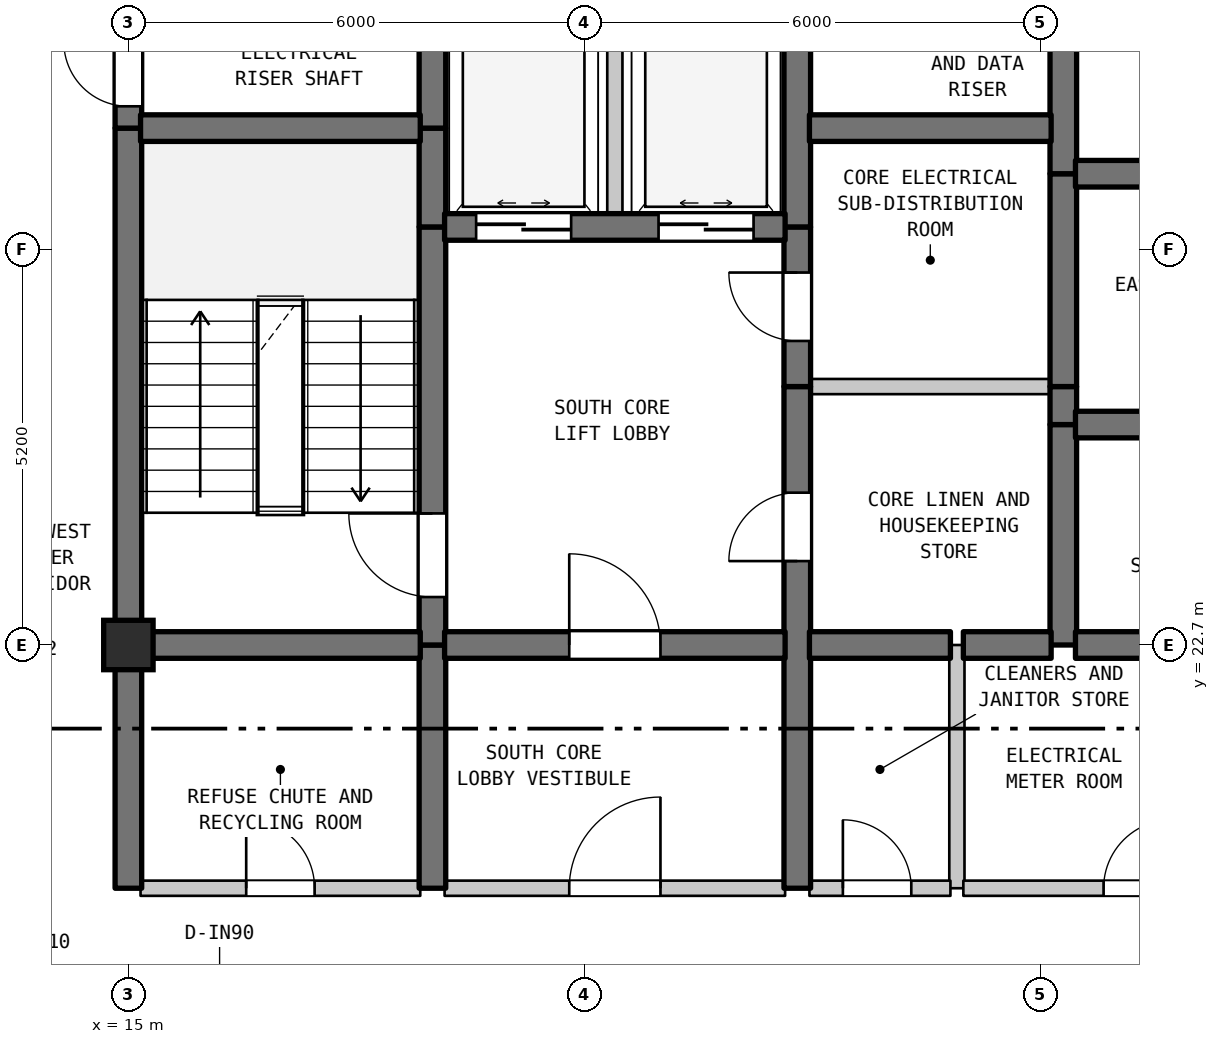
"""IFC4 building model, lengths in metres.
Left out: names, types, materials, properties, quantities, classifications, styles, units other than length and angle.
Written with IfcOpenShell. Run it as: python <this file> out.ifc"""

import sys

from ifc_helpers import new_model, si_unit, direction, frame, frame_2d, origin, origin_2d, place, context, subcontext, project, spatial, rectangle, extrude, element, fill, save


model = new_model("IFC4")
c1 = context("Model", 3, precision=1e-05, world=origin(), true_north=direction((0.0, 1.0)))
c2 = subcontext(c1, "Body", "Model", "MODEL_VIEW")
j1 = project(units=[si_unit("LENGTHUNIT", "METRE"), si_unit("PLANEANGLEUNIT", "RADIAN")], contexts=[c1])
p1 = place(None, origin())
s1 = spatial("IfcSite", under=j1, at=p1, CompositionType="ELEMENT")
p2 = place(p1, origin())
s2 = spatial("IfcBuilding", under=s1, at=p2, CompositionType="ELEMENT")
p3 = place(p2, frame((0.0, 0.0, 291.7)))
s3 = spatial("IfcBuildingStorey", under=s2, at=p3, CompositionType="ELEMENT", Elevation=291.7)
p4 = place(p3, frame((15.0, 22.7, 0.0), z_axis=(0.0, 0.0, 1.0), x_axis=(1.0, 0.0, 0.0)))
e1 = element("IfcColumn", 1, at=p4, inside=s3, PredefinedType="COLUMN", context=c2, shape_type="SweptSolid", body=[
    extrude(rectangle(XDim=0.65, YDim=0.65, at=origin_2d()), origin(), (0.0, 0.0, 1.0), 3.7),
])
p5 = place(p3, frame((15.0, 19.5, 0.0), z_axis=(0.0, 0.0, 1.0), x_axis=(0.0, 1.0, 0.0)))
e2 = element("IfcWall", 2, at=p5, inside=s3, PredefinedType="SHEAR", context=c2, shape_type="SweptSolid", body=[
    extrude(rectangle(XDim=3.2, YDim=0.35, at=frame_2d((1.6, 0.0))), origin(), (0.0, 0.0, 1.0), 3.39),
])
p6 = place(p3, frame((15.0, 22.7, 0.0), z_axis=(0.0, 0.0, 1.0), x_axis=(0.0, 1.0, 0.0)))
e3 = element("IfcWall", 3, at=p6, inside=s3, PredefinedType="SHEAR", context=c2, shape_type="SweptSolid", body=[
    extrude(rectangle(XDim=6.8, YDim=0.35, at=frame_2d((3.4, 0.0))), origin(), (0.0, 0.0, 1.0), 3.39),
])
p7 = place(p3, frame((15.0, 29.5, 0.0), z_axis=(0.0, 0.0, 1.0), x_axis=(0.0, 1.0, 0.0)))
e4 = element("IfcWall", 4, at=p7, inside=s3, PredefinedType="SHEAR", context=c2, shape_type="SweptSolid", body=[
    extrude(rectangle(XDim=1.6, YDim=0.35, at=frame_2d((0.8, 0.0))), origin(), (0.0, 0.0, 1.0), 3.39),
])
p8 = place(p7, frame((0.287, 0.0, 0.0)))
e5 = element("IfcOpeningElement", 5, at=p8, cuts=e4, PredefinedType="OPENING", context=c2, shape_type="SweptSolid", body=[
    extrude(rectangle(XDim=0.85, YDim=2.1, at=frame_2d((0.425, 1.05))), frame((0.0, 0.185, 0.0), z_axis=(0.0, -1.0, 0.0), x_axis=(1.0, 0.0, 0.0)), (0.0, 0.0, 1.0), 0.37),
])
p9 = place(p3, frame((19.0, 19.5, 0.0), z_axis=(0.0, 0.0, 1.0), x_axis=(0.0, 1.0, 0.0)))
e6 = element("IfcWall", 6, at=p9, inside=s3, PredefinedType="SHEAR", context=c2, shape_type="SweptSolid", body=[
    extrude(rectangle(XDim=3.2, YDim=0.35, at=frame_2d((1.6, 0.0))), origin(), (0.0, 0.0, 1.0), 3.39),
])
p10 = place(p3, frame((19.0, 22.7, 0.0), z_axis=(0.0, 0.0, 1.0), x_axis=(0.0, 1.0, 0.0)))
e7 = element("IfcWall", 7, at=p10, inside=s3, PredefinedType="SHEAR", context=c2, shape_type="SweptSolid", body=[
    extrude(rectangle(XDim=5.5, YDim=0.35, at=frame_2d((2.75, 0.0))), origin(), (0.0, 0.0, 1.0), 3.39),
])
p11 = place(p10, frame((0.631, 0.0, 0.0)))
e8 = element("IfcOpeningElement", 8, at=p11, cuts=e7, PredefinedType="OPENING", context=c2, shape_type="SweptSolid", body=[
    extrude(rectangle(XDim=1.1, YDim=2.15, at=frame_2d((0.55, 1.075))), frame((0.0, 0.185, 0.0), z_axis=(0.0, -1.0, 0.0), x_axis=(1.0, 0.0, 0.0)), (0.0, 0.0, 1.0), 0.37),
])
p12 = place(p3, frame((19.0, 28.2, 0.0), z_axis=(0.0, 0.0, 1.0), x_axis=(0.0, 1.0, 0.0)))
e9 = element("IfcWall", 9, at=p12, inside=s3, PredefinedType="SHEAR", context=c2, shape_type="SweptSolid", body=[
    extrude(rectangle(XDim=1.3, YDim=0.35, at=frame_2d((0.65, 0.0))), origin(), (0.0, 0.0, 1.0), 3.39),
])
p13 = place(p3, frame((19.0, 29.5, 0.0), z_axis=(0.0, 0.0, 1.0), x_axis=(0.0, 1.0, 0.0)))
e10 = element("IfcWall", 10, at=p13, inside=s3, PredefinedType="SHEAR", context=c2, shape_type="SweptSolid", body=[
    extrude(rectangle(XDim=5.5, YDim=0.35, at=frame_2d((2.75, 0.0))), origin(), (0.0, 0.0, 1.0), 3.39),
])
p14 = place(p13, frame((2.025, 0.0, 0.0)))
e11 = element("IfcOpeningElement", 11, at=p14, cuts=e10, PredefinedType="OPENING", context=c2, shape_type="SweptSolid", body=[
    extrude(rectangle(XDim=1.1, YDim=2.15, at=frame_2d((0.55, 1.075))), frame((0.0, 0.185, 0.0), z_axis=(0.0, -1.0, 0.0), x_axis=(1.0, 0.0, 0.0)), (0.0, 0.0, 1.0), 0.37),
])
p15 = place(p3, frame((21.4, 28.2, 0.0), z_axis=(0.0, 0.0, 1.0), x_axis=(0.0, 1.0, 0.0)))
e12 = element("IfcWall", 12, at=p15, inside=s3, PredefinedType="STANDARD", context=c2, shape_type="SweptSolid", body=[
    extrude(rectangle(XDim=2.6, YDim=0.2, at=frame_2d((1.3, 0.0))), origin(), (0.0, 0.0, 1.0), 3.39),
])
p16 = place(p3, frame((23.8, 19.5, 0.0), z_axis=(0.0, 0.0, 1.0), x_axis=(0.0, 1.0, 0.0)))
e13 = element("IfcWall", 13, at=p16, inside=s3, PredefinedType="SHEAR", context=c2, shape_type="SweptSolid", body=[
    extrude(rectangle(XDim=6.6, YDim=0.35, at=frame_2d((3.3, 0.0))), origin(), (0.0, 0.0, 1.0), 3.39),
])
p17 = place(p16, frame((4.304, 0.0, 0.0)))
e14 = element("IfcOpeningElement", 14, at=p17, cuts=e13, PredefinedType="OPENING", context=c2, shape_type="SweptSolid", body=[
    extrude(rectangle(XDim=0.9, YDim=2.15, at=frame_2d((0.45, 1.075))), frame((0.0, 0.185, 0.0), z_axis=(0.0, -1.0, 0.0), x_axis=(1.0, 0.0, 0.0)), (0.0, 0.0, 1.0), 0.37),
])
p18 = place(p3, frame((23.8, 26.1, 0.0), z_axis=(0.0, 0.0, 1.0), x_axis=(0.0, 1.0, 0.0)))
e15 = element("IfcWall", 15, at=p18, inside=s3, PredefinedType="SHEAR", context=c2, shape_type="SweptSolid", body=[
    extrude(rectangle(XDim=2.1, YDim=0.35, at=frame_2d((1.05, 0.0))), origin(), (0.0, 0.0, 1.0), 3.39),
])
p19 = place(p18, frame((0.6, 0.0, 0.0)))
e16 = element("IfcOpeningElement", 16, at=p19, cuts=e15, PredefinedType="OPENING", context=c2, shape_type="SweptSolid", body=[
    extrude(rectangle(XDim=0.9, YDim=2.15, at=frame_2d((0.45, 1.075))), frame((0.0, 0.185, 0.0), z_axis=(0.0, -1.0, 0.0), x_axis=(1.0, 0.0, 0.0)), (0.0, 0.0, 1.0), 0.37),
])
p20 = place(p3, frame((23.8, 28.2, 0.0), z_axis=(0.0, 0.0, 1.0), x_axis=(0.0, 1.0, 0.0)))
e17 = element("IfcWall", 17, at=p20, inside=s3, PredefinedType="SHEAR", context=c2, shape_type="SweptSolid", body=[
    extrude(rectangle(XDim=2.6, YDim=0.35, at=frame_2d((1.3, 0.0))), origin(), (0.0, 0.0, 1.0), 3.39),
])
p21 = place(p3, frame((25.9, 19.5, 0.0), z_axis=(0.0, 0.0, 1.0), x_axis=(0.0, 1.0, 0.0)))
e18 = element("IfcWall", 18, at=p21, inside=s3, PredefinedType="STANDARD", context=c2, shape_type="SweptSolid", body=[
    extrude(rectangle(XDim=3.2, YDim=0.2, at=frame_2d((1.6, 0.0))), origin(), (0.0, 0.0, 1.0), 3.39),
])
p22 = place(p3, frame((27.3, 22.7, 0.0), z_axis=(0.0, 0.0, 1.0), x_axis=(0.0, 1.0, 0.0)))
e19 = element("IfcWall", 19, at=p22, inside=s3, PredefinedType="SHEAR", context=c2, shape_type="SweptSolid", body=[
    extrude(rectangle(XDim=2.9, YDim=0.35, at=frame_2d((1.45, 0.0))), origin(), (0.0, 0.0, 1.0), 3.39),
])
p23 = place(p3, frame((27.3, 25.6, 0.0), z_axis=(0.0, 0.0, 1.0), x_axis=(0.0, 1.0, 0.0)))
e20 = element("IfcWall", 20, at=p23, inside=s3, PredefinedType="SHEAR", context=c2, shape_type="SweptSolid", body=[
    extrude(rectangle(XDim=0.5, YDim=0.35, at=frame_2d((0.25, 0.0))), origin(), (0.0, 0.0, 1.0), 3.39),
])
p24 = place(p3, frame((27.3, 26.1, 0.0), z_axis=(0.0, 0.0, 1.0), x_axis=(0.0, 1.0, 0.0)))
e21 = element("IfcWall", 21, at=p24, inside=s3, PredefinedType="SHEAR", context=c2, shape_type="SweptSolid", body=[
    extrude(rectangle(XDim=2.8, YDim=0.35, at=frame_2d((1.4, 0.0))), origin(), (0.0, 0.0, 1.0), 3.39),
])
p25 = place(p3, frame((27.3, 28.9, 0.0), z_axis=(0.0, 0.0, 1.0), x_axis=(0.0, 1.0, 0.0)))
e22 = element("IfcWall", 22, at=p25, inside=s3, PredefinedType="SHEAR", context=c2, shape_type="SweptSolid", body=[
    extrude(rectangle(XDim=2.6, YDim=0.35, at=frame_2d((1.3, 0.0))), origin(), (0.0, 0.0, 1.0), 3.39),
])
p26 = place(p3, frame((15.16, 19.5, 0.0), z_axis=(0.0, 0.0, 1.0), x_axis=(1.0, 0.0, 0.0)))
e23 = element("IfcWall", 23, at=p26, inside=s3, PredefinedType="STANDARD", context=c2, shape_type="SweptSolid", body=[
    extrude(rectangle(XDim=3.68, YDim=0.2, at=frame_2d((1.84, 0.0))), origin(), (0.0, 0.0, 1.0), 3.39),
])
p27 = place(p26, frame((1.39, 0.0, 0.0)))
e24 = element("IfcOpeningElement", 24, at=p27, cuts=e23, PredefinedType="OPENING", context=c2, shape_type="SweptSolid", body=[
    extrude(rectangle(XDim=0.9, YDim=2.15, at=frame_2d((0.45, 1.075))), frame((0.0, 0.11, 0.0), z_axis=(0.0, -1.0, 0.0), x_axis=(1.0, 0.0, 0.0)), (0.0, 0.0, 1.0), 0.22),
])
p28 = place(p3, frame((19.16, 19.5, 0.0), z_axis=(0.0, 0.0, 1.0), x_axis=(1.0, 0.0, 0.0)))
e25 = element("IfcWall", 25, at=p28, inside=s3, PredefinedType="STANDARD", context=c2, shape_type="SweptSolid", body=[
    extrude(rectangle(XDim=4.48, YDim=0.2, at=frame_2d((2.24, 0.0))), origin(), (0.0, 0.0, 1.0), 3.39),
])
p29 = place(p28, frame((1.64, 0.0, 0.0)))
e26 = element("IfcOpeningElement", 26, at=p29, cuts=e25, PredefinedType="OPENING", context=c2, shape_type="SweptSolid", body=[
    extrude(rectangle(XDim=1.2, YDim=2.2, at=frame_2d((0.6, 1.1))), frame((0.0, 0.11, 0.0), z_axis=(0.0, -1.0, 0.0), x_axis=(1.0, 0.0, 0.0)), (0.0, 0.0, 1.0), 0.22),
])
p30 = place(p3, frame((23.96, 19.5, 0.0), z_axis=(0.0, 0.0, 1.0), x_axis=(1.0, 0.0, 0.0)))
e27 = element("IfcWall", 27, at=p30, inside=s3, PredefinedType="STANDARD", context=c2, shape_type="SweptSolid", body=[
    extrude(rectangle(XDim=1.855, YDim=0.2, at=frame_2d((0.927, 0.0))), origin(), (0.0, 0.0, 1.0), 3.39),
])
p31 = place(p30, frame((0.44, 0.0, 0.0)))
e28 = element("IfcOpeningElement", 28, at=p31, cuts=e27, PredefinedType="OPENING", context=c2, shape_type="SweptSolid", body=[
    extrude(rectangle(XDim=0.9, YDim=2.15, at=frame_2d((0.45, 1.075))), frame((0.0, 0.11, 0.0), z_axis=(0.0, -1.0, 0.0), x_axis=(1.0, 0.0, 0.0)), (0.0, 0.0, 1.0), 0.22),
])
p32 = place(p3, frame((25.985, 19.5, 0.0), z_axis=(0.0, 0.0, 1.0), x_axis=(1.0, 0.0, 0.0)))
e29 = element("IfcWall", 29, at=p32, inside=s3, PredefinedType="STANDARD", context=c2, shape_type="SweptSolid", body=[
    extrude(rectangle(XDim=4.655, YDim=0.2, at=frame_2d((2.327, 0.0))), origin(), (0.0, 0.0, 1.0), 3.39),
])
p33 = place(p32, frame((1.845, 0.0, 0.0)))
e30 = element("IfcOpeningElement", 30, at=p33, cuts=e29, PredefinedType="OPENING", context=c2, shape_type="SweptSolid", body=[
    extrude(rectangle(XDim=0.9, YDim=2.15, at=frame_2d((0.45, 1.075))), frame((0.0, 0.11, 0.0), z_axis=(0.0, -1.0, 0.0), x_axis=(1.0, 0.0, 0.0)), (0.0, 0.0, 1.0), 0.22),
])
p34 = place(p3, frame((15.16, 22.7, 0.0), z_axis=(0.0, 0.0, 1.0), x_axis=(1.0, 0.0, 0.0)))
e31 = element("IfcWall", 31, at=p34, inside=s3, PredefinedType="SHEAR", context=c2, shape_type="SweptSolid", body=[
    extrude(rectangle(XDim=3.68, YDim=0.35, at=frame_2d((1.84, 0.0))), origin(), (0.0, 0.0, 1.0), 3.39),
])
p35 = place(p3, frame((19.16, 22.7, 0.0), z_axis=(0.0, 0.0, 1.0), x_axis=(1.0, 0.0, 0.0)))
e32 = element("IfcWall", 32, at=p35, inside=s3, PredefinedType="SHEAR", context=c2, shape_type="SweptSolid", body=[
    extrude(rectangle(XDim=4.48, YDim=0.35, at=frame_2d((2.24, 0.0))), origin(), (0.0, 0.0, 1.0), 3.39),
])
p36 = place(p35, frame((1.64, 0.0, 0.0)))
e33 = element("IfcOpeningElement", 33, at=p36, cuts=e32, PredefinedType="OPENING", context=c2, shape_type="SweptSolid", body=[
    extrude(rectangle(XDim=1.2, YDim=2.2, at=frame_2d((0.6, 1.1))), frame((0.0, 0.185, 0.0), z_axis=(0.0, -1.0, 0.0), x_axis=(1.0, 0.0, 0.0)), (0.0, 0.0, 1.0), 0.37),
])
p37 = place(p3, frame((23.96, 22.7, 0.0), z_axis=(0.0, 0.0, 1.0), x_axis=(1.0, 0.0, 0.0)))
e34 = element("IfcWall", 34, at=p37, inside=s3, PredefinedType="SHEAR", context=c2, shape_type="SweptSolid", body=[
    extrude(rectangle(XDim=1.855, YDim=0.35, at=frame_2d((0.927, 0.0))), origin(), (0.0, 0.0, 1.0), 3.39),
])
p38 = place(p3, frame((25.985, 22.7, 0.0), z_axis=(0.0, 0.0, 1.0), x_axis=(1.0, 0.0, 0.0)))
e35 = element("IfcWall", 35, at=p38, inside=s3, PredefinedType="SHEAR", context=c2, shape_type="SweptSolid", body=[
    extrude(rectangle(XDim=1.155, YDim=0.35, at=frame_2d((0.577, 0.0))), origin(), (0.0, 0.0, 1.0), 3.39),
])
p39 = place(p3, frame((27.46, 22.7, 0.0), z_axis=(0.0, 0.0, 1.0), x_axis=(1.0, 0.0, 0.0)))
e36 = element("IfcWall", 36, at=p39, inside=s3, PredefinedType="SHEAR", context=c2, shape_type="SweptSolid", body=[
    extrude(rectangle(XDim=3.18, YDim=0.35, at=frame_2d((1.59, 0.0))), origin(), (0.0, 0.0, 1.0), 3.39),
])
p40 = place(p3, frame((27.46, 25.6, 0.0), z_axis=(0.0, 0.0, 1.0), x_axis=(1.0, 0.0, 0.0)))
e37 = element("IfcWall", 37, at=p40, inside=s3, PredefinedType="SHEAR", context=c2, shape_type="SweptSolid", body=[
    extrude(rectangle(XDim=3.18, YDim=0.35, at=frame_2d((1.59, 0.0))), origin(), (0.0, 0.0, 1.0), 3.39),
])
p41 = place(p40, frame((1.115, 0.0, 0.0)))
e38 = element("IfcOpeningElement", 38, at=p41, cuts=e37, PredefinedType="OPENING", context=c2, shape_type="SweptSolid", body=[
    extrude(rectangle(XDim=0.95, YDim=2.15, at=frame_2d((0.475, 1.075))), frame((0.0, 0.185, 0.0), z_axis=(0.0, -1.0, 0.0), x_axis=(1.0, 0.0, 0.0)), (0.0, 0.0, 1.0), 0.37),
])
p42 = place(p3, frame((23.96, 26.1, 0.0), z_axis=(0.0, 0.0, 1.0), x_axis=(1.0, 0.0, 0.0)))
e39 = element("IfcWall", 39, at=p42, inside=s3, PredefinedType="STANDARD", context=c2, shape_type="SweptSolid", body=[
    extrude(rectangle(XDim=3.18, YDim=0.2, at=frame_2d((1.59, 0.0))), origin(), (0.0, 0.0, 1.0), 3.39),
])
p43 = place(p3, frame((19.16, 28.2, 0.0), z_axis=(0.0, 0.0, 1.0), x_axis=(1.0, 0.0, 0.0)))
e40 = element("IfcWall", 40, at=p43, inside=s3, PredefinedType="SHEAR", context=c2, shape_type="SweptSolid", body=[
    extrude(rectangle(XDim=4.48, YDim=0.35, at=frame_2d((2.24, 0.0))), origin(), (0.0, 0.0, 1.0), 3.39),
])
p44 = place(p43, frame((0.415, 0.0, 0.0)))
e41 = element("IfcOpeningElement", 41, at=p44, cuts=e40, PredefinedType="OPENING", context=c2, shape_type="SweptSolid", body=[
    extrude(rectangle(XDim=1.25, YDim=2.2, at=frame_2d((0.625, 1.1))), frame((0.0, 0.185, 0.0), z_axis=(0.0, -1.0, 0.0), x_axis=(1.0, 0.0, 0.0)), (0.0, 0.0, 1.0), 0.37),
])
p45 = place(p43, frame((2.815, 0.0, 0.0)))
e42 = element("IfcOpeningElement", 42, at=p45, cuts=e40, PredefinedType="OPENING", context=c2, shape_type="SweptSolid", body=[
    extrude(rectangle(XDim=1.25, YDim=2.2, at=frame_2d((0.625, 1.1))), frame((0.0, 0.185, 0.0), z_axis=(0.0, -1.0, 0.0), x_axis=(1.0, 0.0, 0.0)), (0.0, 0.0, 1.0), 0.37),
])
p46 = place(p3, frame((27.46, 28.9, 0.0), z_axis=(0.0, 0.0, 1.0), x_axis=(1.0, 0.0, 0.0)))
e43 = element("IfcWall", 43, at=p46, inside=s3, PredefinedType="SHEAR", context=c2, shape_type="SweptSolid", body=[
    extrude(rectangle(XDim=3.18, YDim=0.35, at=frame_2d((1.59, 0.0))), origin(), (0.0, 0.0, 1.0), 3.39),
])
p47 = place(p46, frame((1.115, 0.0, 0.0)))
e44 = element("IfcOpeningElement", 44, at=p47, cuts=e43, PredefinedType="OPENING", context=c2, shape_type="SweptSolid", body=[
    extrude(rectangle(XDim=0.95, YDim=2.15, at=frame_2d((0.475, 1.075))), frame((0.0, 0.185, 0.0), z_axis=(0.0, -1.0, 0.0), x_axis=(1.0, 0.0, 0.0)), (0.0, 0.0, 1.0), 0.37),
])
p48 = place(p3, frame((15.16, 29.5, 0.0), z_axis=(0.0, 0.0, 1.0), x_axis=(1.0, 0.0, 0.0)))
e45 = element("IfcWall", 45, at=p48, inside=s3, PredefinedType="SHEAR", context=c2, shape_type="SweptSolid", body=[
    extrude(rectangle(XDim=3.68, YDim=0.35, at=frame_2d((1.84, 0.0))), origin(), (0.0, 0.0, 1.0), 3.39),
])
p49 = place(p3, frame((23.96, 29.5, 0.0), z_axis=(0.0, 0.0, 1.0), x_axis=(1.0, 0.0, 0.0)))
e46 = element("IfcWall", 46, at=p49, inside=s3, PredefinedType="SHEAR", context=c2, shape_type="SweptSolid", body=[
    extrude(rectangle(XDim=3.18, YDim=0.35, at=frame_2d((1.59, 0.0))), origin(), (0.0, 0.0, 1.0), 3.39),
])
p50 = place(p8, origin())
e47 = element("IfcDoor", 47, at=p50, inside=s3, OperationType="SINGLE_SWING_RIGHT", PredefinedType="DOOR", context=c2, shape_type="SweptSolid", body=[
    extrude(rectangle(XDim=0.85, YDim=2.1, at=frame_2d((0.425, 1.05))), frame((0.0, 0.025, 0.0), z_axis=(0.0, -1.0, 0.0), x_axis=(1.0, 0.0, 0.0)), (0.0, 0.0, 1.0), 0.05),
])
fill(e5, e47)
p51 = place(p11, origin())
e48 = element("IfcDoor", 48, at=p51, inside=s3, OperationType="SINGLE_SWING_RIGHT", PredefinedType="DOOR", context=c2, shape_type="SweptSolid", body=[
    extrude(rectangle(XDim=1.1, YDim=2.15, at=frame_2d((0.55, 1.075))), frame((0.0, 0.025, 0.0), z_axis=(0.0, -1.0, 0.0), x_axis=(1.0, 0.0, 0.0)), (0.0, 0.0, 1.0), 0.05),
])
fill(e8, e48)
p52 = place(p17, origin())
e49 = element("IfcDoor", 49, at=p52, inside=s3, OperationType="SINGLE_SWING_LEFT", PredefinedType="DOOR", context=c2, shape_type="SweptSolid", body=[
    extrude(rectangle(XDim=0.9, YDim=2.15, at=frame_2d((0.45, 1.075))), frame((0.0, 0.025, 0.0), z_axis=(0.0, -1.0, 0.0), x_axis=(1.0, 0.0, 0.0)), (0.0, 0.0, 1.0), 0.05),
])
fill(e14, e49)
p53 = place(p19, origin())
e50 = element("IfcDoor", 50, at=p53, inside=s3, OperationType="SINGLE_SWING_RIGHT", PredefinedType="DOOR", context=c2, shape_type="SweptSolid", body=[
    extrude(rectangle(XDim=0.9, YDim=2.15, at=frame_2d((0.45, 1.075))), frame((0.0, 0.025, 0.0), z_axis=(0.0, -1.0, 0.0), x_axis=(1.0, 0.0, 0.0)), (0.0, 0.0, 1.0), 0.05),
])
fill(e16, e50)
p54 = place(p27, origin())
e51 = element("IfcDoor", 51, at=p54, inside=s3, OperationType="SINGLE_SWING_LEFT", PredefinedType="DOOR", context=c2, shape_type="SweptSolid", body=[
    extrude(rectangle(XDim=0.9, YDim=2.15, at=frame_2d((0.45, 1.075))), frame((0.0, 0.025, 0.0), z_axis=(0.0, -1.0, 0.0), x_axis=(1.0, 0.0, 0.0)), (0.0, 0.0, 1.0), 0.05),
])
fill(e24, e51)
p55 = place(p29, origin())
e52 = element("IfcDoor", 52, at=p55, inside=s3, OperationType="SINGLE_SWING_RIGHT", PredefinedType="DOOR", context=c2, shape_type="SweptSolid", body=[
    extrude(rectangle(XDim=1.2, YDim=2.2, at=frame_2d((0.6, 1.1))), frame((0.0, 0.025, 0.0), z_axis=(0.0, -1.0, 0.0), x_axis=(1.0, 0.0, 0.0)), (0.0, 0.0, 1.0), 0.05),
])
fill(e26, e52)
p56 = place(p31, origin())
e53 = element("IfcDoor", 53, at=p56, inside=s3, OperationType="SINGLE_SWING_LEFT", PredefinedType="DOOR", context=c2, shape_type="SweptSolid", body=[
    extrude(rectangle(XDim=0.9, YDim=2.15, at=frame_2d((0.45, 1.075))), frame((0.0, 0.025, 0.0), z_axis=(0.0, -1.0, 0.0), x_axis=(1.0, 0.0, 0.0)), (0.0, 0.0, 1.0), 0.05),
])
fill(e28, e53)
p57 = place(p33, origin())
e54 = element("IfcDoor", 54, at=p57, inside=s3, OperationType="SINGLE_SWING_RIGHT", PredefinedType="DOOR", context=c2, shape_type="SweptSolid", body=[
    extrude(rectangle(XDim=0.9, YDim=2.15, at=frame_2d((0.45, 1.075))), frame((0.0, 0.025, 0.0), z_axis=(0.0, -1.0, 0.0), x_axis=(1.0, 0.0, 0.0)), (0.0, 0.0, 1.0), 0.05),
])
fill(e30, e54)
p58 = place(p36, origin())
e55 = element("IfcDoor", 55, at=p58, inside=s3, OperationType="SINGLE_SWING_LEFT", PredefinedType="DOOR", context=c2, shape_type="SweptSolid", body=[
    extrude(rectangle(XDim=1.2, YDim=2.2, at=frame_2d((0.6, 1.1))), frame((0.0, 0.025, 0.0), z_axis=(0.0, -1.0, 0.0), x_axis=(1.0, 0.0, 0.0)), (0.0, 0.0, 1.0), 0.05),
])
fill(e33, e55)
p59 = place(p44, origin())
e56 = element("IfcDoor", 56, at=p59, inside=s3, OperationType="DOUBLE_DOOR_SLIDING", PredefinedType="DOOR", context=c2, shape_type="SweptSolid", body=[
    extrude(rectangle(XDim=1.25, YDim=2.2, at=frame_2d((0.625, 1.1))), frame((0.0, 0.025, 0.0), z_axis=(0.0, -1.0, 0.0), x_axis=(1.0, 0.0, 0.0)), (0.0, 0.0, 1.0), 0.05),
])
fill(e41, e56)
p60 = place(p45, origin())
e57 = element("IfcDoor", 57, at=p60, inside=s3, OperationType="DOUBLE_DOOR_SLIDING", PredefinedType="DOOR", context=c2, shape_type="SweptSolid", body=[
    extrude(rectangle(XDim=1.25, YDim=2.2, at=frame_2d((0.625, 1.1))), frame((0.0, 0.025, 0.0), z_axis=(0.0, -1.0, 0.0), x_axis=(1.0, 0.0, 0.0)), (0.0, 0.0, 1.0), 0.05),
])
fill(e42, e57)
save(model, sys.argv[1])
